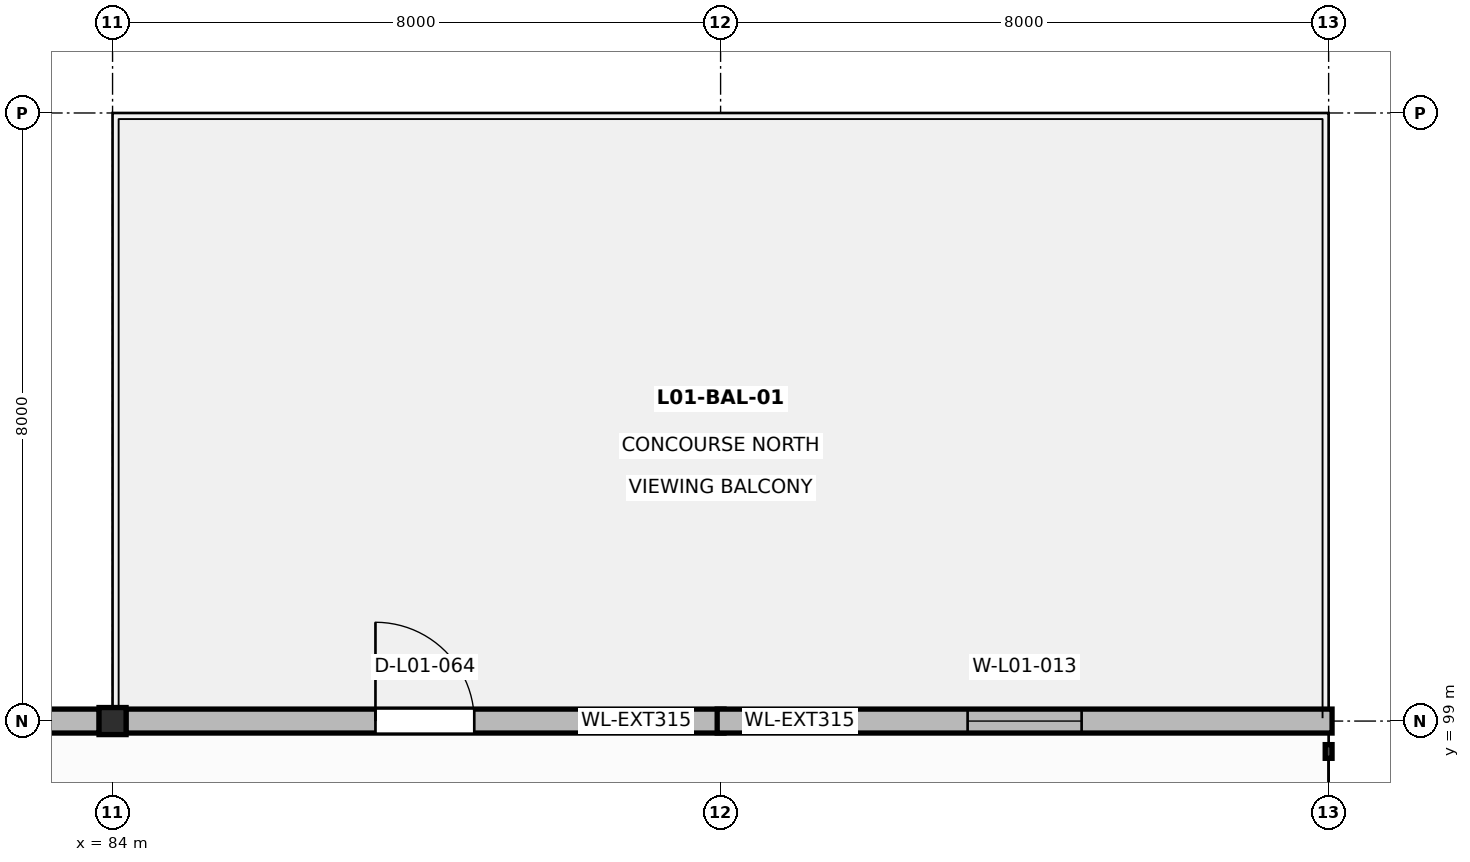
"""IFC4 building model, lengths in metres.
Left out: names, types, materials, properties, quantities, classifications, styles, units other than length and angle.
Written with IfcOpenShell. Run it as: python <this file> out.ifc"""

import sys

from ifc_helpers import new_model, si_unit, direction, frame, frame_2d, origin, origin_2d, place, context, subcontext, project, spatial, rectangle, hollow_rectangle, extrude, element, fill, save


model = new_model("IFC4")
c1 = context("Model", 3, precision=1e-05, world=origin(), true_north=direction((0.0, 1.0)))
c2 = subcontext(c1, "Body", "Model", "MODEL_VIEW")
j1 = project(units=[si_unit("LENGTHUNIT", "METRE"), si_unit("PLANEANGLEUNIT", "RADIAN")], contexts=[c1])
p1 = place(None, origin())
s1 = spatial("IfcSite", under=j1, at=p1, CompositionType="ELEMENT")
p2 = place(p1, origin())
s2 = spatial("IfcBuilding", under=s1, at=p2, CompositionType="ELEMENT")
p3 = place(p2, frame((0.0, 0.0, 6.0)))
s3 = spatial("IfcBuildingStorey", under=s2, at=p3, CompositionType="ELEMENT", Elevation=6.0)
p4 = place(p3, frame((84.0, 99.0, 0.0), z_axis=(0.0, 0.0, 1.0), x_axis=(1.0, 0.0, 0.0)))
e1 = element("IfcColumn", 1, at=p4, inside=s3, PredefinedType="COLUMN", context=c2, shape_type="SweptSolid", body=[
    extrude(hollow_rectangle(XDim=0.356, YDim=0.356, WallThickness=0.015, at=origin_2d()), origin(), (0.0, 0.0, 1.0), 5.2),
])
p5 = place(p3, frame((76.174, 99.0, 0.0), z_axis=(0.0, 0.0, 1.0), x_axis=(1.0, 0.0, 0.0)))
e2 = element("IfcWall", 2, at=p5, inside=s3, PredefinedType="SOLIDWALL", context=c2, shape_type="SweptSolid", body=[
    extrude(rectangle(XDim=7.652, YDim=0.315, at=frame_2d((3.826, 0.0))), origin(), (0.0, 0.0, 1.0), 4.35),
])
p6 = place(p5, frame((3.026, 0.0, 0.85)))
e3 = element("IfcOpeningElement", 3, at=p6, cuts=e2, PredefinedType="OPENING", context=c2, shape_type="SweptSolid", body=[
    extrude(rectangle(XDim=1.6, YDim=1.8, at=frame_2d((0.8, 0.9))), frame((0.0, 0.167, 0.0), z_axis=(0.0, -1.0, 0.0), x_axis=(1.0, 0.0, 0.0)), (0.0, 0.0, 1.0), 0.335),
])
p7 = place(p3, frame((84.174, 99.0, 0.0), z_axis=(0.0, 0.0, 1.0), x_axis=(1.0, 0.0, 0.0)))
e4 = element("IfcWall", 4, at=p7, inside=s3, PredefinedType="SOLIDWALL", context=c2, shape_type="SweptSolid", body=[
    extrude(rectangle(XDim=7.871, YDim=0.315, at=frame_2d((3.936, 0.0))), origin(), (0.0, 0.0, 1.0), 4.35),
])
p8 = place(p7, frame((3.285, 0.0, 0.0)))
e5 = element("IfcOpeningElement", 5, at=p8, cuts=e4, PredefinedType="OPENING", context=c2, shape_type="SweptSolid", body=[
    extrude(rectangle(XDim=1.3, YDim=2.18, at=frame_2d((0.65, 1.09))), frame((0.0, 0.167, 0.0), z_axis=(0.0, -1.0, 0.0), x_axis=(1.0, 0.0, 0.0)), (0.0, 0.0, 1.0), 0.335),
])
p9 = place(p3, frame((91.955, 99.0, 0.0), z_axis=(0.0, 0.0, 1.0), x_axis=(1.0, 0.0, 0.0)))
e6 = element("IfcWall", 6, at=p9, inside=s3, PredefinedType="SOLIDWALL", context=c2, shape_type="SweptSolid", body=[
    extrude(rectangle(XDim=8.09, YDim=0.315, at=frame_2d((4.045, 0.0))), origin(), (0.0, 0.0, 1.0), 4.35),
])
p10 = place(p9, frame((3.295, 0.0, 0.85)))
e7 = element("IfcOpeningElement", 7, at=p10, cuts=e6, PredefinedType="OPENING", context=c2, shape_type="SweptSolid", body=[
    extrude(rectangle(XDim=1.5, YDim=1.7, at=frame_2d((0.75, 0.85))), frame((0.0, 0.167, 0.0), z_axis=(0.0, -1.0, 0.0), x_axis=(1.0, 0.0, 0.0)), (0.0, 0.0, 1.0), 0.335),
])
p11 = place(p8, origin())
e8 = element("IfcDoor", 8, at=p11, inside=s3, OperationType="SINGLE_SWING_LEFT", PredefinedType="DOOR", context=c2, shape_type="SweptSolid", body=[
    extrude(rectangle(XDim=1.3, YDim=2.18, at=frame_2d((0.65, 1.09))), frame((0.0, 0.025, 0.0), z_axis=(0.0, -1.0, 0.0), x_axis=(1.0, 0.0, 0.0)), (0.0, 0.0, 1.0), 0.05),
])
fill(e5, e8)
p12 = place(p10, origin())
e9 = element("IfcWindow", 9, at=p12, inside=s3, PartitioningType="SINGLE_PANEL", PredefinedType="WINDOW", context=c2, shape_type="SweptSolid", body=[
    extrude(rectangle(XDim=1.5, YDim=1.7, at=frame_2d((0.75, 0.85))), frame((0.0, 0.03, 0.0), z_axis=(0.0, -1.0, 0.0), x_axis=(1.0, 0.0, 0.0)), (0.0, 0.0, 1.0), 0.06),
])
fill(e7, e9)
save(model, sys.argv[1])
